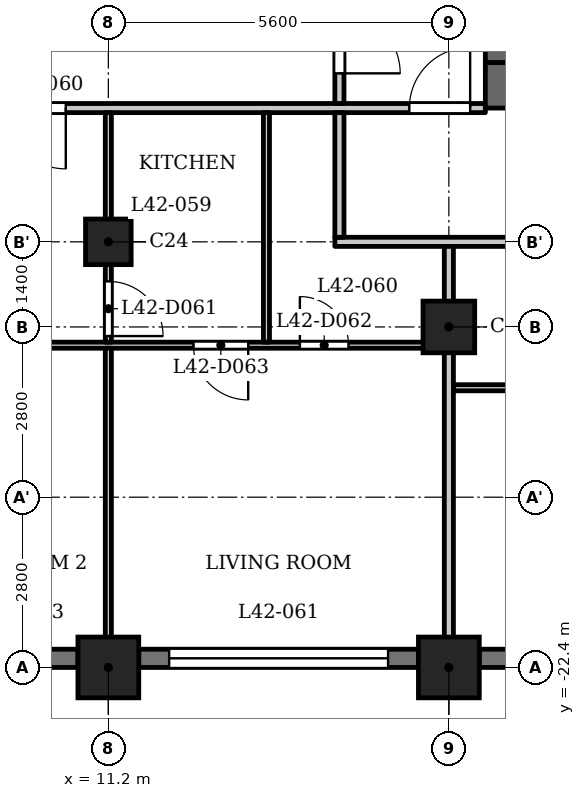
"""IFC4 building model, lengths in metres.
Left out: names, types, materials, properties, quantities, classifications, styles, units other than length and angle.
Written with IfcOpenShell. Run it as: python <this file> out.ifc"""

import sys

from ifc_helpers import new_model, si_unit, direction, frame, frame_2d, origin, origin_2d, place, context, subcontext, project, spatial, rectangle, extrude, element, fill, save


model = new_model("IFC4")
c1 = context("Model", 3, precision=1e-05, world=origin(), true_north=direction((0.0, 1.0)))
c2 = subcontext(c1, "Body", "Model", "MODEL_VIEW")
j1 = project(units=[si_unit("LENGTHUNIT", "METRE"), si_unit("PLANEANGLEUNIT", "RADIAN")], contexts=[c1])
p1 = place(None, origin())
s1 = spatial("IfcSite", under=j1, at=p1, CompositionType="ELEMENT")
p2 = place(p1, origin())
s2 = spatial("IfcBuilding", under=s1, at=p2, CompositionType="ELEMENT")
p3 = place(p2, frame((0.0, 0.0, 164.1)))
s3 = spatial("IfcBuildingStorey", under=s2, at=p3, CompositionType="ELEMENT", Elevation=164.1)
for number, where, z_axis, x_axis in (
    (1, (11.2, -22.4, 0.0), (0.0, 0.0, 1.0), (1.0, 0.0, 0.0)),
    (2, (16.8, -22.4, 0.0), (0.0, 0.0, 1.0), (1.0, 0.0, 0.0)),
):
    element("IfcColumn", number, at=place(p3, frame(where, z_axis=z_axis, x_axis=x_axis)), inside=s3, PredefinedType="COLUMN", context=c2, shape_type="SweptSolid", body=[
        extrude(rectangle(XDim=1.0, YDim=1.0, at=origin_2d()), origin(), (0.0, 0.0, 1.0), 3.5),
    ])
p4 = place(p3, frame((16.8, -16.8, 0.0), z_axis=(0.0, 0.0, 1.0), x_axis=(1.0, 0.0, 0.0)))
e3 = element("IfcColumn", 3, at=p4, inside=s3, PredefinedType="COLUMN", context=c2, shape_type="SweptSolid", body=[
    extrude(rectangle(XDim=0.85, YDim=0.85, at=origin_2d()), origin(), (0.0, 0.0, 1.0), 3.5),
])
p5 = place(p3, frame((11.2, -15.4, 0.0), z_axis=(0.0, 0.0, 1.0), x_axis=(1.0, 0.0, 0.0)))
e4 = element("IfcColumn", 4, at=p5, inside=s3, PredefinedType="COLUMN", context=c2, shape_type="SweptSolid", body=[
    extrude(rectangle(XDim=0.75, YDim=0.75, at=origin_2d()), origin(), (0.0, 0.0, 1.0), 3.5),
])
p6 = place(p3, frame((6.1, -22.25, 0.0), z_axis=(0.0, 0.0, 1.0), x_axis=(1.0, 0.0, 0.0)))
e5 = element("IfcWall", 5, at=p6, inside=s3, PredefinedType="SOLIDWALL", context=c2, shape_type="SweptSolid", body=[
    extrude(rectangle(XDim=4.6, YDim=0.3, at=frame_2d((2.3, 0.0))), origin(), (0.0, 0.0, 1.0), 2.45),
])
p7 = place(p6, frame((0.512, 0.0, 0.6)))
e6 = element("IfcOpeningElement", 6, at=p7, cuts=e5, PredefinedType="OPENING", context=c2, shape_type="SweptSolid", body=[
    extrude(rectangle(XDim=1.2, YDim=1.55, at=frame_2d((0.6, 0.775))), frame((0.0, 0.16, 0.0), z_axis=(0.0, -1.0, 0.0), x_axis=(1.0, 0.0, 0.0)), (0.0, 0.0, 1.0), 0.32),
])
p8 = place(p6, frame((2.887, 0.0, 0.6)))
e7 = element("IfcOpeningElement", 7, at=p8, cuts=e5, PredefinedType="OPENING", context=c2, shape_type="SweptSolid", body=[
    extrude(rectangle(XDim=1.2, YDim=1.55, at=frame_2d((0.6, 0.775))), frame((0.0, 0.16, 0.0), z_axis=(0.0, -1.0, 0.0), x_axis=(1.0, 0.0, 0.0)), (0.0, 0.0, 1.0), 0.32),
])
p9 = place(p3, frame((11.7, -22.25, 0.0), z_axis=(0.0, 0.0, 1.0), x_axis=(1.0, 0.0, 0.0)))
e8 = element("IfcWall", 8, at=p9, inside=s3, PredefinedType="SOLIDWALL", context=c2, shape_type="SweptSolid", body=[
    extrude(rectangle(XDim=4.6, YDim=0.3, at=frame_2d((2.3, 0.0))), origin(), (0.0, 0.0, 1.0), 2.45),
])
p10 = place(p9, frame((0.5, 0.0, 1.2)))
e9 = element("IfcOpeningElement", 9, at=p10, cuts=e8, PredefinedType="OPENING", context=c2, shape_type="SweptSolid", body=[
    extrude(rectangle(XDim=3.6, YDim=0.95, at=frame_2d((1.8, 0.475))), frame((0.0, 0.16, 0.0), z_axis=(0.0, -1.0, 0.0), x_axis=(1.0, 0.0, 0.0)), (0.0, 0.0, 1.0), 0.32),
])
p11 = place(p3, frame((17.3, -22.25, 0.0), z_axis=(0.0, 0.0, 1.0), x_axis=(1.0, 0.0, 0.0)))
e10 = element("IfcWall", 10, at=p11, inside=s3, PredefinedType="SOLIDWALL", context=c2, shape_type="SweptSolid", body=[
    extrude(rectangle(XDim=2.7, YDim=0.3, at=frame_2d((1.35, 0.0))), origin(), (0.0, 0.0, 1.0), 2.45),
])
p12 = place(p11, frame((0.75, 0.0, 0.6)))
e11 = element("IfcOpeningElement", 11, at=p12, cuts=e10, PredefinedType="OPENING", context=c2, shape_type="SweptSolid", body=[
    extrude(rectangle(XDim=1.2, YDim=1.55, at=frame_2d((0.6, 0.775))), frame((0.0, 0.16, 0.0), z_axis=(0.0, -1.0, 0.0), x_axis=(1.0, 0.0, 0.0)), (0.0, 0.0, 1.0), 0.32),
])
p13 = place(p3, frame((17.4, -12.825, 0.0), z_axis=(0.0, 0.0, 1.0), x_axis=(1.0, 0.0, 0.0)))
e12 = element("IfcWall", 12, at=p13, inside=s3, PredefinedType="SHEAR", context=c2, shape_type="SweptSolid", body=[
    extrude(rectangle(XDim=10.4, YDim=0.75, at=frame_2d((5.2, 0.0))), origin(), (0.0, 0.0, 1.0), 3.2),
])
p14 = place(p3, frame((17.6, -12.45, 0.0), z_axis=(0.0, 0.0, 1.0), x_axis=(0.0, 1.0, 0.0)))
e13 = element("IfcWall", 13, at=p14, inside=s3, PredefinedType="SHEAR", context=c2, shape_type="SweptSolid", body=[
    extrude(rectangle(XDim=24.9, YDim=0.4, at=frame_2d((12.45, 0.0))), origin(), (0.0, 0.0, 1.0), 3.2),
])
p15 = place(p14, frame((8.65, 0.0, 0.0)))
e14 = element("IfcOpeningElement", 14, at=p15, cuts=e13, PredefinedType="OPENING", context=c2, shape_type="SweptSolid", body=[
    extrude(rectangle(XDim=0.9, YDim=2.1, at=frame_2d((0.45, 1.05))), frame((0.0, 0.21, 0.0), z_axis=(0.0, -1.0, 0.0), x_axis=(1.0, 0.0, 0.0)), (0.0, 0.0, 1.0), 0.42),
])
p16 = place(p14, frame((15.6, 0.0, 0.0)))
e15 = element("IfcOpeningElement", 15, at=p16, cuts=e13, PredefinedType="OPENING", context=c2, shape_type="SweptSolid", body=[
    extrude(rectangle(XDim=1.1, YDim=2.1, at=frame_2d((0.55, 1.05))), frame((0.0, 0.21, 0.0), z_axis=(0.0, -1.0, 0.0), x_axis=(1.0, 0.0, 0.0)), (0.0, 0.0, 1.0), 0.42),
])
p17 = place(p14, frame((18.0, 0.0, 0.0)))
e16 = element("IfcOpeningElement", 16, at=p17, cuts=e13, PredefinedType="OPENING", context=c2, shape_type="SweptSolid", body=[
    extrude(rectangle(XDim=1.1, YDim=2.1, at=frame_2d((0.55, 1.05))), frame((0.0, 0.21, 0.0), z_axis=(0.0, -1.0, 0.0), x_axis=(1.0, 0.0, 0.0)), (0.0, 0.0, 1.0), 0.42),
])
p18 = place(p14, frame((23.025, 0.0, 0.0)))
e17 = element("IfcOpeningElement", 17, at=p18, cuts=e13, PredefinedType="OPENING", context=c2, shape_type="SweptSolid", body=[
    extrude(rectangle(XDim=1.1, YDim=2.1, at=frame_2d((0.55, 1.05))), frame((0.0, 0.21, 0.0), z_axis=(0.0, -1.0, 0.0), x_axis=(1.0, 0.0, 0.0)), (0.0, 0.0, 1.0), 0.42),
])
p19 = place(p14, frame((0.775, 0.0, 0.0)))
e18 = element("IfcOpeningElement", 18, at=p19, cuts=e13, PredefinedType="OPENING", context=c2, shape_type="SweptSolid", body=[
    extrude(rectangle(XDim=1.1, YDim=2.1, at=frame_2d((0.55, 1.05))), frame((0.0, 0.21, 0.0), z_axis=(0.0, -1.0, 0.0), x_axis=(1.0, 0.0, 0.0)), (0.0, 0.0, 1.0), 0.42),
])
p20 = place(p14, frame((12.925, 0.0, 0.0)))
e19 = element("IfcOpeningElement", 19, at=p20, cuts=e13, PredefinedType="OPENING", context=c2, shape_type="SweptSolid", body=[
    extrude(rectangle(XDim=1.8, YDim=2.1, at=frame_2d((0.9, 1.05))), frame((0.0, 0.21, 0.0), z_axis=(0.0, -1.0, 0.0), x_axis=(1.0, 0.0, 0.0)), (0.0, 0.0, 1.0), 0.42),
])
p21 = place(p3, frame((16.875, -17.8, 0.0), z_axis=(0.0, 0.0, 1.0), x_axis=(1.0, 0.0, 0.0)))
e20 = element("IfcWall", 20, at=p21, inside=s3, PredefinedType="PARTITIONING", context=c2, shape_type="SweptSolid", body=[
    extrude(rectangle(XDim=9.519, YDim=0.1, at=frame_2d((4.76, 0.0))), origin(), (0.0, 0.0, 1.0), 3.2),
])
p22 = place(p21, frame((7.843, 0.0, 0.0)))
e21 = element("IfcOpeningElement", 21, at=p22, cuts=e20, PredefinedType="OPENING", context=c2, shape_type="SweptSolid", body=[
    extrude(rectangle(XDim=0.8, YDim=2.1, at=frame_2d((0.4, 1.05))), frame((0.0, 0.06, 0.0), z_axis=(0.0, -1.0, 0.0), x_axis=(1.0, 0.0, 0.0)), (0.0, 0.0, 1.0), 0.12),
])
p23 = place(p21, frame((2.825, 0.0, 0.0)))
e22 = element("IfcOpeningElement", 22, at=p23, cuts=e20, PredefinedType="OPENING", context=c2, shape_type="SweptSolid", body=[
    extrude(rectangle(XDim=0.9, YDim=2.1, at=frame_2d((0.45, 1.05))), frame((0.0, 0.06, 0.0), z_axis=(0.0, -1.0, 0.0), x_axis=(1.0, 0.0, 0.0)), (0.0, 0.0, 1.0), 0.12),
])
p24 = place(p3, frame((-16.725, -17.1, 0.0), z_axis=(0.0, 0.0, 1.0), x_axis=(1.0, 0.0, 0.0)))
e23 = element("IfcWall", 23, at=p24, inside=s3, PredefinedType="PARTITIONING", context=c2, shape_type="SweptSolid", body=[
    extrude(rectangle(XDim=33.45, YDim=0.1, at=frame_2d((16.725, 0.0))), origin(), (0.0, 0.0, 1.0), 3.2),
])
p25 = place(p24, frame((0.725, 0.0, 0.0)))
e24 = element("IfcOpeningElement", 24, at=p25, cuts=e23, PredefinedType="OPENING", context=c2, shape_type="SweptSolid", body=[
    extrude(rectangle(XDim=0.8, YDim=2.1, at=frame_2d((0.4, 1.05))), frame((0.0, 0.06, 0.0), z_axis=(0.0, -1.0, 0.0), x_axis=(1.0, 0.0, 0.0)), (0.0, 0.0, 1.0), 0.12),
])
p26 = place(p24, frame((3.175, 0.0, 0.0)))
e25 = element("IfcOpeningElement", 25, at=p26, cuts=e23, PredefinedType="OPENING", context=c2, shape_type="SweptSolid", body=[
    extrude(rectangle(XDim=0.9, YDim=2.1, at=frame_2d((0.45, 1.05))), frame((0.0, 0.06, 0.0), z_axis=(0.0, -1.0, 0.0), x_axis=(1.0, 0.0, 0.0)), (0.0, 0.0, 1.0), 0.12),
])
p27 = place(p24, frame((6.075, 0.0, 0.0)))
e26 = element("IfcOpeningElement", 26, at=p27, cuts=e23, PredefinedType="OPENING", context=c2, shape_type="SweptSolid", body=[
    extrude(rectangle(XDim=0.8, YDim=2.1, at=frame_2d((0.4, 1.05))), frame((0.0, 0.06, 0.0), z_axis=(0.0, -1.0, 0.0), x_axis=(1.0, 0.0, 0.0)), (0.0, 0.0, 1.0), 0.12),
])
p28 = place(p24, frame((9.425, 0.0, 0.0)))
e27 = element("IfcOpeningElement", 27, at=p28, cuts=e23, PredefinedType="OPENING", context=c2, shape_type="SweptSolid", body=[
    extrude(rectangle(XDim=0.9, YDim=2.1, at=frame_2d((0.45, 1.05))), frame((0.0, 0.06, 0.0), z_axis=(0.0, -1.0, 0.0), x_axis=(1.0, 0.0, 0.0)), (0.0, 0.0, 1.0), 0.12),
])
p29 = place(p24, frame((12.675, 0.0, 0.0)))
e28 = element("IfcOpeningElement", 28, at=p29, cuts=e23, PredefinedType="OPENING", context=c2, shape_type="SweptSolid", body=[
    extrude(rectangle(XDim=0.8, YDim=2.1, at=frame_2d((0.4, 1.05))), frame((0.0, 0.06, 0.0), z_axis=(0.0, -1.0, 0.0), x_axis=(1.0, 0.0, 0.0)), (0.0, 0.0, 1.0), 0.12),
])
p30 = place(p24, frame((15.275, 0.0, 0.0)))
e29 = element("IfcOpeningElement", 29, at=p30, cuts=e23, PredefinedType="OPENING", context=c2, shape_type="SweptSolid", body=[
    extrude(rectangle(XDim=0.9, YDim=2.1, at=frame_2d((0.45, 1.05))), frame((0.0, 0.06, 0.0), z_axis=(0.0, -1.0, 0.0), x_axis=(1.0, 0.0, 0.0)), (0.0, 0.0, 1.0), 0.12),
])
p31 = place(p24, frame((20.625, 0.0, 0.0)))
e30 = element("IfcOpeningElement", 30, at=p31, cuts=e23, PredefinedType="OPENING", context=c2, shape_type="SweptSolid", body=[
    extrude(rectangle(XDim=0.8, YDim=2.1, at=frame_2d((0.4, 1.05))), frame((0.0, 0.06, 0.0), z_axis=(0.0, -1.0, 0.0), x_axis=(1.0, 0.0, 0.0)), (0.0, 0.0, 1.0), 0.12),
])
p32 = place(p24, frame((17.375, 0.0, 0.0)))
e31 = element("IfcOpeningElement", 31, at=p32, cuts=e23, PredefinedType="OPENING", context=c2, shape_type="SweptSolid", body=[
    extrude(rectangle(XDim=0.9, YDim=2.1, at=frame_2d((0.45, 1.05))), frame((0.0, 0.06, 0.0), z_axis=(0.0, -1.0, 0.0), x_axis=(1.0, 0.0, 0.0)), (0.0, 0.0, 1.0), 0.12),
])
p33 = place(p24, frame((31.075, 0.0, 0.0)))
e32 = element("IfcOpeningElement", 32, at=p33, cuts=e23, PredefinedType="OPENING", context=c2, shape_type="SweptSolid", body=[
    extrude(rectangle(XDim=0.8, YDim=2.1, at=frame_2d((0.4, 1.05))), frame((0.0, 0.06, 0.0), z_axis=(0.0, -1.0, 0.0), x_axis=(1.0, 0.0, 0.0)), (0.0, 0.0, 1.0), 0.12),
])
p34 = place(p24, frame((29.325, 0.0, 0.0)))
e33 = element("IfcOpeningElement", 33, at=p34, cuts=e23, PredefinedType="OPENING", context=c2, shape_type="SweptSolid", body=[
    extrude(rectangle(XDim=0.9, YDim=2.1, at=frame_2d((0.45, 1.05))), frame((0.0, 0.06, 0.0), z_axis=(0.0, -1.0, 0.0), x_axis=(1.0, 0.0, 0.0)), (0.0, 0.0, 1.0), 0.12),
])
p35 = place(p24, frame((23.725, 0.0, 0.0)))
e34 = element("IfcOpeningElement", 34, at=p35, cuts=e23, PredefinedType="OPENING", context=c2, shape_type="SweptSolid", body=[
    extrude(rectangle(XDim=0.9, YDim=2.1, at=frame_2d((0.45, 1.05))), frame((0.0, 0.06, 0.0), z_axis=(0.0, -1.0, 0.0), x_axis=(1.0, 0.0, 0.0)), (0.0, 0.0, 1.0), 0.12),
])
p36 = place(p24, frame((25.775, 0.0, 0.0)))
e35 = element("IfcOpeningElement", 35, at=p36, cuts=e23, PredefinedType="OPENING", context=c2, shape_type="SweptSolid", body=[
    extrude(rectangle(XDim=0.9, YDim=2.1, at=frame_2d((0.45, 1.05))), frame((0.0, 0.06, 0.0), z_axis=(0.0, -1.0, 0.0), x_axis=(1.0, 0.0, 0.0)), (0.0, 0.0, 1.0), 0.12),
])
p37 = place(p3, frame((14.925, -15.4, 0.0), z_axis=(0.0, 0.0, 1.0), x_axis=(1.0, 0.0, 0.0)))
e36 = element("IfcWall", 36, at=p37, inside=s3, PredefinedType="PARTITIONING", context=c2, shape_type="SweptSolid", body=[
    extrude(rectangle(XDim=12.559, YDim=0.15, at=frame_2d((6.279, 0.0))), origin(), (0.0, 0.0, 1.0), 3.2),
])
p38 = place(p37, frame((5.775, 0.0, 0.0)))
e37 = element("IfcOpeningElement", 37, at=p38, cuts=e36, PredefinedType="OPENING", context=c2, shape_type="SweptSolid", body=[
    extrude(rectangle(XDim=1.0, YDim=2.1, at=frame_2d((0.5, 1.05))), frame((0.0, 0.085, 0.0), z_axis=(0.0, -1.0, 0.0), x_axis=(1.0, 0.0, 0.0)), (0.0, 0.0, 1.0), 0.17),
])
p39 = place(p3, frame((-17.4, -13.2, 0.0), z_axis=(0.0, 0.0, 1.0), x_axis=(1.0, 0.0, 0.0)))
e38 = element("IfcWall", 38, at=p39, inside=s3, PredefinedType="PARTITIONING", context=c2, shape_type="SweptSolid", body=[
    extrude(rectangle(XDim=34.8, YDim=0.15, at=frame_2d((17.4, 0.0))), origin(), (0.0, 0.0, 1.0), 3.2),
])
p40 = place(p39, frame((0.15, 0.0, 0.0)))
e39 = element("IfcOpeningElement", 39, at=p40, cuts=e38, PredefinedType="OPENING", context=c2, shape_type="SweptSolid", body=[
    extrude(rectangle(XDim=1.0, YDim=2.1, at=frame_2d((0.5, 1.05))), frame((0.0, 0.085, 0.0), z_axis=(0.0, -1.0, 0.0), x_axis=(1.0, 0.0, 0.0)), (0.0, 0.0, 1.0), 0.17),
])
p41 = place(p39, frame((33.55, 0.0, 0.0)))
e40 = element("IfcOpeningElement", 40, at=p41, cuts=e38, PredefinedType="OPENING", context=c2, shape_type="SweptSolid", body=[
    extrude(rectangle(XDim=1.0, YDim=2.1, at=frame_2d((0.5, 1.05))), frame((0.0, 0.085, 0.0), z_axis=(0.0, -1.0, 0.0), x_axis=(1.0, 0.0, 0.0)), (0.0, 0.0, 1.0), 0.17),
])
p42 = place(p39, frame((3.5, 0.0, 0.0)))
e41 = element("IfcOpeningElement", 41, at=p42, cuts=e38, PredefinedType="OPENING", context=c2, shape_type="SweptSolid", body=[
    extrude(rectangle(XDim=1.0, YDim=2.1, at=frame_2d((0.5, 1.05))), frame((0.0, 0.085, 0.0), z_axis=(0.0, -1.0, 0.0), x_axis=(1.0, 0.0, 0.0)), (0.0, 0.0, 1.0), 0.17),
])
p43 = place(p39, frame((10.1, 0.0, 0.0)))
e42 = element("IfcOpeningElement", 42, at=p43, cuts=e38, PredefinedType="OPENING", context=c2, shape_type="SweptSolid", body=[
    extrude(rectangle(XDim=1.0, YDim=2.1, at=frame_2d((0.5, 1.05))), frame((0.0, 0.085, 0.0), z_axis=(0.0, -1.0, 0.0), x_axis=(1.0, 0.0, 0.0)), (0.0, 0.0, 1.0), 0.17),
])
p44 = place(p39, frame((15.7, 0.0, 0.0)))
e43 = element("IfcOpeningElement", 43, at=p44, cuts=e38, PredefinedType="OPENING", context=c2, shape_type="SweptSolid", body=[
    extrude(rectangle(XDim=1.0, YDim=2.1, at=frame_2d((0.5, 1.05))), frame((0.0, 0.085, 0.0), z_axis=(0.0, -1.0, 0.0), x_axis=(1.0, 0.0, 0.0)), (0.0, 0.0, 1.0), 0.17),
])
p45 = place(p39, frame((18.05, 0.0, 0.0)))
e44 = element("IfcOpeningElement", 44, at=p45, cuts=e38, PredefinedType="OPENING", context=c2, shape_type="SweptSolid", body=[
    extrude(rectangle(XDim=1.0, YDim=2.1, at=frame_2d((0.5, 1.05))), frame((0.0, 0.085, 0.0), z_axis=(0.0, -1.0, 0.0), x_axis=(1.0, 0.0, 0.0)), (0.0, 0.0, 1.0), 0.17),
])
p46 = place(p39, frame((26.9, 0.0, 0.0)))
e45 = element("IfcOpeningElement", 45, at=p46, cuts=e38, PredefinedType="OPENING", context=c2, shape_type="SweptSolid", body=[
    extrude(rectangle(XDim=1.0, YDim=2.1, at=frame_2d((0.5, 1.05))), frame((0.0, 0.085, 0.0), z_axis=(0.0, -1.0, 0.0), x_axis=(1.0, 0.0, 0.0)), (0.0, 0.0, 1.0), 0.17),
])
p47 = place(p3, frame((11.2, -22.88, 0.0), z_axis=(0.0, 0.0, 1.0), x_axis=(0.0, 1.0, 0.0)))
e46 = element("IfcWall", 46, at=p47, inside=s3, PredefinedType="PARTITIONING", context=c2, shape_type="SweptSolid", body=[
    extrude(rectangle(XDim=5.73, YDim=0.1, at=frame_2d((2.865, 0.0))), origin(), (0.0, 0.0, 1.0), 3.2),
])
p48 = place(p3, frame((11.2, -17.05, 0.0), z_axis=(0.0, 0.0, 1.0), x_axis=(0.0, 1.0, 0.0)))
e47 = element("IfcWall", 47, at=p48, inside=s3, PredefinedType="PARTITIONING", context=c2, shape_type="SweptSolid", body=[
    extrude(rectangle(XDim=3.775, YDim=0.1, at=frame_2d((1.888, 0.0))), origin(), (0.0, 0.0, 1.0), 3.2),
])
p49 = place(p48, frame((0.1, 0.0, 0.0)))
e48 = element("IfcOpeningElement", 48, at=p49, cuts=e47, PredefinedType="OPENING", context=c2, shape_type="SweptSolid", body=[
    extrude(rectangle(XDim=0.9, YDim=2.1, at=frame_2d((0.45, 1.05))), frame((0.0, 0.06, 0.0), z_axis=(0.0, -1.0, 0.0), x_axis=(1.0, 0.0, 0.0)), (0.0, 0.0, 1.0), 0.12),
])
p50 = place(p3, frame((13.8, -17.05, 0.0), z_axis=(0.0, 0.0, 1.0), x_axis=(0.0, 1.0, 0.0)))
e49 = element("IfcWall", 49, at=p50, inside=s3, PredefinedType="PARTITIONING", context=c2, shape_type="SweptSolid", body=[
    extrude(rectangle(XDim=3.775, YDim=0.1, at=frame_2d((1.888, 0.0))), origin(), (0.0, 0.0, 1.0), 3.2),
])
p51 = place(p3, frame((15.0, -15.325, 0.0), z_axis=(0.0, 0.0, 1.0), x_axis=(0.0, 1.0, 0.0)))
e50 = element("IfcWall", 50, at=p51, inside=s3, PredefinedType="PARTITIONING", context=c2, shape_type="SweptSolid", body=[
    extrude(rectangle(XDim=2.05, YDim=0.15, at=frame_2d((1.025, 0.0))), origin(), (0.0, 0.0, 1.0), 3.2),
])
p52 = place(p3, frame((15.0, -13.125, 0.0), z_axis=(0.0, 0.0, 1.0), x_axis=(0.0, 1.0, 0.0)))
e51 = element("IfcWall", 51, at=p52, inside=s3, PredefinedType="PARTITIONING", context=c2, shape_type="SweptSolid", body=[
    extrude(rectangle(XDim=6.356, YDim=0.15, at=frame_2d((3.178, 0.0))), origin(), (0.0, 0.0, 1.0), 3.2),
])
p53 = place(p52, frame((0.496, 0.0, 0.0)))
e52 = element("IfcOpeningElement", 52, at=p53, cuts=e51, PredefinedType="OPENING", context=c2, shape_type="SweptSolid", body=[
    extrude(rectangle(XDim=1.0, YDim=2.1, at=frame_2d((0.5, 1.05))), frame((0.0, 0.085, 0.0), z_axis=(0.0, -1.0, 0.0), x_axis=(1.0, 0.0, 0.0)), (0.0, 0.0, 1.0), 0.17),
])
p54 = place(p3, frame((16.8, -22.88, 0.0), z_axis=(0.0, 0.0, 1.0), x_axis=(0.0, 1.0, 0.0)))
e53 = element("IfcWall", 53, at=p54, inside=s3, PredefinedType="PARTITIONING", context=c2, shape_type="SweptSolid", body=[
    extrude(rectangle(XDim=7.405, YDim=0.15, at=frame_2d((3.702, 0.0))), origin(), (0.0, 0.0, 1.0), 3.2),
])
p55 = place(p53, origin())
e54 = element("IfcDoor", 54, at=p55, inside=s3, OperationType="SINGLE_SWING_LEFT", PredefinedType="DOOR", context=c2, shape_type="SweptSolid", body=[
    extrude(rectangle(XDim=1.0, YDim=2.1, at=frame_2d((0.5, 1.05))), frame((0.0, 0.025, 0.0), z_axis=(0.0, -1.0, 0.0), x_axis=(1.0, 0.0, 0.0)), (0.0, 0.0, 1.0), 0.05),
])
fill(e52, e54)
p56 = place(p41, origin())
e55 = element("IfcDoor", 55, at=p56, inside=s3, OperationType="SINGLE_SWING_LEFT", PredefinedType="DOOR", context=c2, shape_type="SweptSolid", body=[
    extrude(rectangle(XDim=1.0, YDim=2.1, at=frame_2d((0.5, 1.05))), frame((0.0, 0.025, 0.0), z_axis=(0.0, -1.0, 0.0), x_axis=(1.0, 0.0, 0.0)), (0.0, 0.0, 1.0), 0.05),
])
fill(e40, e55)
p57 = place(p46, origin())
e56 = element("IfcDoor", 56, at=p57, inside=s3, OperationType="SINGLE_SWING_RIGHT", PredefinedType="DOOR", context=c2, shape_type="SweptSolid", body=[
    extrude(rectangle(XDim=1.0, YDim=2.1, at=frame_2d((0.5, 1.05))), frame((0.0, 0.025, 0.0), z_axis=(0.0, -1.0, 0.0), x_axis=(1.0, 0.0, 0.0)), (0.0, 0.0, 1.0), 0.05),
])
fill(e45, e56)
p58 = place(p49, origin())
e57 = element("IfcDoor", 57, at=p58, inside=s3, OperationType="SINGLE_SWING_LEFT", PredefinedType="DOOR", context=c2, shape_type="SweptSolid", body=[
    extrude(rectangle(XDim=0.9, YDim=2.1, at=frame_2d((0.45, 1.05))), frame((0.0, 0.025, 0.0), z_axis=(0.0, -1.0, 0.0), x_axis=(1.0, 0.0, 0.0)), (0.0, 0.0, 1.0), 0.05),
])
fill(e48, e57)
p59 = place(p33, origin())
e58 = element("IfcDoor", 58, at=p59, inside=s3, OperationType="SINGLE_SWING_RIGHT", PredefinedType="DOOR", context=c2, shape_type="SweptSolid", body=[
    extrude(rectangle(XDim=0.8, YDim=2.1, at=frame_2d((0.4, 1.05))), frame((0.0, 0.025, 0.0), z_axis=(0.0, -1.0, 0.0), x_axis=(1.0, 0.0, 0.0)), (0.0, 0.0, 1.0), 0.05),
])
fill(e32, e58)
p60 = place(p34, origin())
e59 = element("IfcDoor", 59, at=p60, inside=s3, OperationType="SINGLE_SWING_RIGHT", PredefinedType="DOOR", context=c2, shape_type="SweptSolid", body=[
    extrude(rectangle(XDim=0.9, YDim=2.1, at=frame_2d((0.45, 1.05))), frame((0.0, 0.025, 0.0), z_axis=(0.0, -1.0, 0.0), x_axis=(1.0, 0.0, 0.0)), (0.0, 0.0, 1.0), 0.05),
])
fill(e33, e59)
p61 = place(p10, origin())
e60 = element("IfcWindow", 60, at=p61, inside=s3, PartitioningType="SINGLE_PANEL", PredefinedType="WINDOW", context=c2, shape_type="SweptSolid", body=[
    extrude(rectangle(XDim=3.6, YDim=0.95, at=frame_2d((1.8, 0.475))), frame((0.0, 0.03, 0.0), z_axis=(0.0, -1.0, 0.0), x_axis=(1.0, 0.0, 0.0)), (0.0, 0.0, 1.0), 0.06),
])
fill(e9, e60)
save(model, sys.argv[1])
